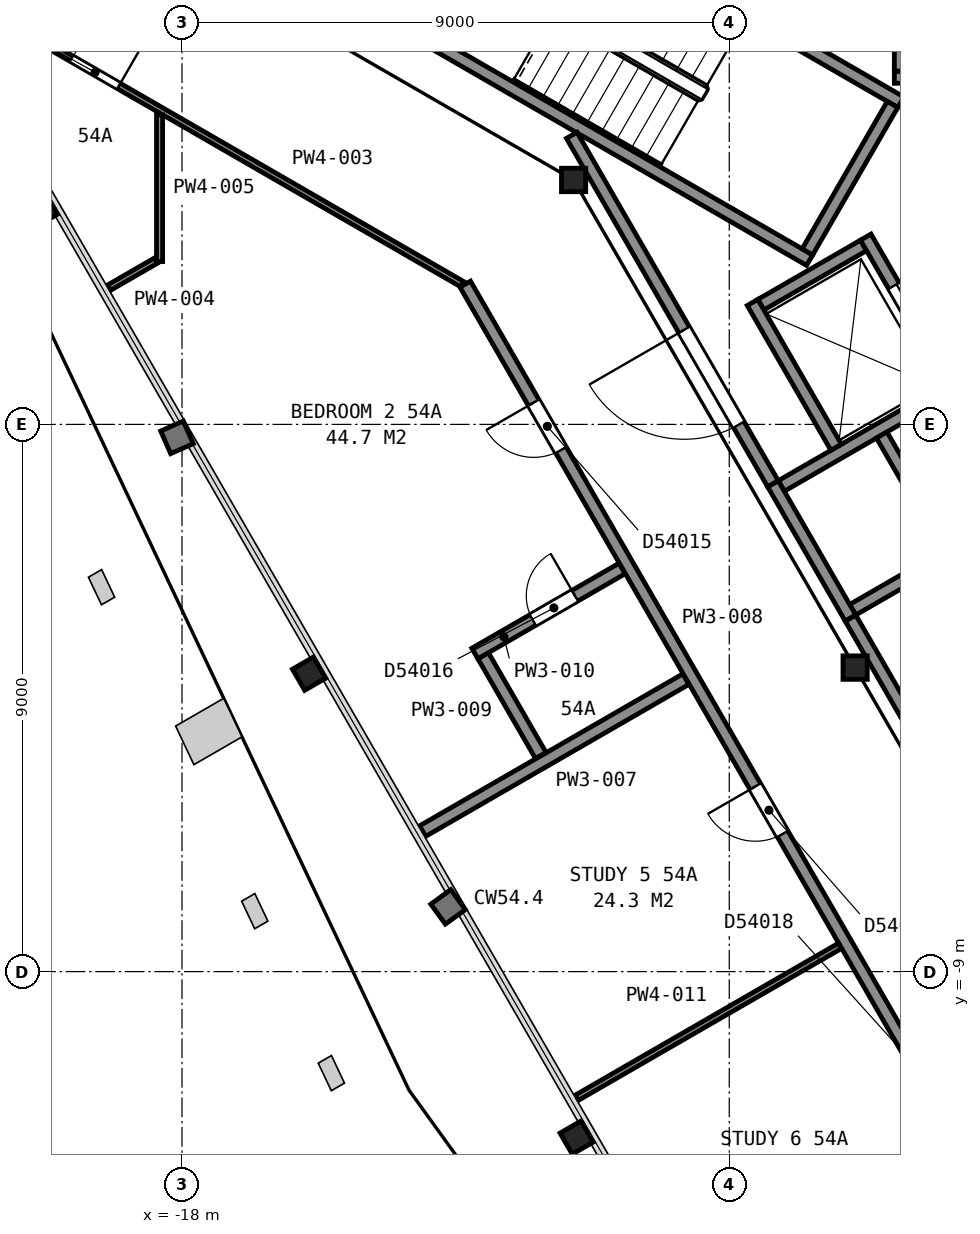
"""IFC4 building model, lengths in metres.
Left out: names, types, materials, properties, quantities, classifications, styles, units other than length and angle.
Written with IfcOpenShell. Run it as: python <this file> out.ifc"""

import sys

from ifc_helpers import new_model, si_unit, direction, frame, frame_2d, origin, origin_2d, place, context, subcontext, project, spatial, rectangle, i_section, extrude, element, fill, save


model = new_model("IFC4")
c1 = context("Model", 3, precision=1e-05, world=origin(), true_north=direction((0.0, 1.0)))
c2 = subcontext(c1, "Body", "Model", "MODEL_VIEW")
j1 = project(units=[si_unit("LENGTHUNIT", "METRE"), si_unit("PLANEANGLEUNIT", "RADIAN")], contexts=[c1])
p1 = place(None, origin())
s1 = spatial("IfcSite", under=j1, at=p1, CompositionType="ELEMENT")
p2 = place(p1, origin())
s2 = spatial("IfcBuilding", under=s1, at=p2, CompositionType="ELEMENT")
p3 = place(p2, frame((0.0, 0.0, 217.5)))
s3 = spatial("IfcBuildingStorey", under=s2, at=p3, CompositionType="ELEMENT", Elevation=217.5)
p4 = place(p3, frame((-20.32, 3.53, 0.04), z_axis=(0.0, 0.0, 1.0), x_axis=(-0.5, 0.866025403784, 0.0)))
e1 = element("IfcColumn", 1, at=p4, inside=s3, PredefinedType="COLUMN", context=c2, shape_type="SweptSolid", body=[
    extrude(i_section(OverallWidth=0.401, OverallDepth=0.399, WebThickness=0.025, FlangeThickness=0.04, FilletRadius=0.015, at=origin_2d()), origin(), (0.0, 0.0, 1.0), 3.66),
])
for number, where, z_axis, x_axis in (
    (2, (-15.91, -4.1, 0.035), (0.0, 0.0, 1.0), (-0.5, 0.866, 0.0)),
    (3, (-11.51, -11.73, 0.035), (0.0, 0.0, 1.0), (-0.5, 0.866, 0.0)),
):
    element("IfcColumn", number, at=place(p3, frame(where, z_axis=z_axis, x_axis=x_axis)), inside=s3, PredefinedType="COLUMN", context=c2, shape_type="SweptSolid", body=[
        extrude(i_section(OverallWidth=0.401, OverallDepth=0.399, WebThickness=0.025, FlangeThickness=0.04, FilletRadius=0.015, at=origin_2d()), origin(), (0.0, 0.0, 1.0), 3.665),
    ])
for number, where, z_axis, x_axis in (
    (4, (-11.56, 4.02, 0.0), (0.0, 0.0, 1.0), (1.0, 0.0, 0.0)),
    (5, (-6.93, -4.0, 0.0), (0.0, 0.0, 1.0), (1.0, 0.0, 0.0)),
):
    element("IfcColumn", number, at=place(p3, frame(where, z_axis=z_axis, x_axis=x_axis)), inside=s3, PredefinedType="COLUMN", context=c2, shape_type="SweptSolid", body=[
        extrude(i_section(OverallWidth=0.399, OverallDepth=0.386, WebThickness=0.021, FlangeThickness=0.033, FilletRadius=0.015, at=origin_2d()), origin(), (0.0, 0.0, 1.0), 3.7),
    ])
for number, where, z_axis, x_axis in (
    (6, (-7.678, 2.701, 0.0), (0.0, 0.0, 1.0), (-0.866, 0.5, 0.0)),
    (7, (-6.178, 5.299, 0.0), (0.0, 0.0, 1.0), (-0.866, 0.5, 0.0)),
):
    element("IfcWall", number, at=place(p3, frame(where, z_axis=z_axis, x_axis=x_axis)), inside=s3, PredefinedType="PARTITIONING", context=c2, shape_type="SweptSolid", body=[
        extrude(rectangle(XDim=9.6, YDim=0.2, at=frame_2d((4.8, 0.0))), origin(), (0.0, 0.0, 1.0), 3.45),
    ])
p5 = place(p3, frame((-6.315, 5.262, 0.0), z_axis=(0.0, 0.0, 1.0), x_axis=(-0.500049511043, -0.865996816683, 0.0)))
e8 = element("IfcWall", 8, at=p5, inside=s3, PredefinedType="PARTITIONING", context=c2, shape_type="SweptSolid", body=[
    extrude(rectangle(XDim=2.8, YDim=0.2, at=frame_2d((1.4, 0.0))), origin(), (0.0, 0.0, 1.0), 3.45),
])
p6 = place(p3, frame((-6.285, 5.71, 0.0), z_axis=(0.0, 0.0, 1.0), x_axis=(1.0, 0.0, 0.0)))
e9 = element("IfcWall", 9, at=p6, inside=s3, PredefinedType="PARTITIONING", context=c2, shape_type="SweptSolid", body=[
    extrude(rectangle(XDim=2.35, YDim=0.2, at=frame_2d((1.175, 0.0))), origin(), (0.0, 0.0, 1.0), 3.7),
])
p7 = place(p3, frame((-6.97, -3.048, 0.0), z_axis=(0.0, 0.0, 1.0), x_axis=(0.866036909293, 0.499980071345, 0.0)))
e10 = element("IfcWall", 10, at=p7, inside=s3, PredefinedType="PARTITIONING", context=c2, shape_type="SweptSolid", body=[
    extrude(rectangle(XDim=1.75, YDim=0.2, at=frame_2d((0.875, 0.0))), origin(), (0.0, 0.0, 1.0), 3.7),
])
p8 = place(p3, frame((-8.145, -1.013, 0.0), z_axis=(0.0, 0.0, 1.0), x_axis=(0.866016494683, 0.500015430699, 0.0)))
e11 = element("IfcWall", 11, at=p8, inside=s3, PredefinedType="PARTITIONING", context=c2, shape_type="SweptSolid", body=[
    extrude(rectangle(XDim=3.15, YDim=0.2, at=frame_2d((1.575, 0.0))), origin(), (0.0, 0.0, 1.0), 3.7),
])
p9 = place(p3, frame((-8.48, 1.969, 0.0), z_axis=(0.0, 0.0, 1.0), x_axis=(0.866000020948, 0.500043961785, 0.0)))
e12 = element("IfcWall", 12, at=p9, inside=s3, PredefinedType="PARTITIONING", context=c2, shape_type="SweptSolid", body=[
    extrude(rectangle(XDim=1.95, YDim=0.2, at=frame_2d((0.975, 0.0))), origin(), (0.0, 0.0, 1.0), 3.7),
])
p10 = place(p3, frame((-6.185, 5.81, 0.0), z_axis=(0.0, 0.0, 1.0), x_axis=(0.0, 1.0, 0.0)))
e13 = element("IfcWall", 13, at=p10, inside=s3, PredefinedType="PARTITIONING", context=c2, shape_type="SweptSolid", body=[
    extrude(rectangle(XDim=1.75, YDim=0.2, at=frame_2d((0.875, 0.0))), origin(), (0.0, 0.0, 1.0), 3.7),
])
p11 = place(p3, frame((-5.28, 0.525, 0.0), z_axis=(0.0, 0.0, 1.0), x_axis=(-0.500037662692, 0.866003658127, 0.0)))
e14 = element("IfcWall", 14, at=p11, inside=s3, PredefinedType="PARTITIONING", context=c2, shape_type="SweptSolid", body=[
    extrude(rectangle(XDim=2.95, YDim=0.2, at=frame_2d((1.475, 0.0))), origin(), (0.0, 0.0, 1.0), 3.7),
])
p12 = place(p11, frame((0.925, 0.0, 0.0)))
e15 = element("IfcOpeningElement", 15, at=p12, cuts=e14, PredefinedType="OPENING", context=c2, shape_type="SweptSolid", body=[
    extrude(rectangle(XDim=1.1, YDim=2.1, at=frame_2d((0.55, 1.05))), frame((0.0, 0.11, 0.0), z_axis=(0.0, -1.0, 0.0), x_axis=(1.0, 0.0, 0.0)), (0.0, 0.0, 1.0), 0.22),
])
p13 = place(p3, frame((-5.318, -2.21, 0.0), z_axis=(0.0, 0.0, 1.0), x_axis=(-0.499938297808, 0.866061024631, 0.0)))
e16 = element("IfcWall", 16, at=p13, inside=s3, PredefinedType="PARTITIONING", context=c2, shape_type="SweptSolid", body=[
    extrude(rectangle(XDim=2.35, YDim=0.2, at=frame_2d((1.175, 0.0))), origin(), (0.0, 0.0, 1.0), 3.7),
])
p14 = place(p3, frame((-7.242, -0.376, 0.0), z_axis=(0.0, 0.0, 1.0), x_axis=(-0.499996545922, 0.866027397988, 0.0)))
e17 = element("IfcWall", 17, at=p14, inside=s3, PredefinedType="PARTITIONING", context=c2, shape_type="SweptSolid", body=[
    extrude(rectangle(XDim=2.75, YDim=0.2, at=frame_2d((1.375, 0.0))), origin(), (0.0, 0.0, 1.0), 3.7),
])
p15 = place(p3, frame((-7.006, -3.185, 0.0), z_axis=(0.0, 0.0, 1.0), x_axis=(-0.499990435942, 0.866030925526, 0.0)))
e18 = element("IfcWall", 18, at=p15, inside=s3, PredefinedType="PARTITIONING", context=c2, shape_type="SweptSolid", body=[
    extrude(rectangle(XDim=2.55, YDim=0.2, at=frame_2d((1.275, 0.0))), origin(), (0.0, 0.0, 1.0), 3.7),
])
p16 = place(p3, frame((-11.591, 4.755, 0.0), z_axis=(0.0, 0.0, 1.0), x_axis=(0.500043977787, -0.866000011708, 0.0)))
e19 = element("IfcWall", 19, at=p16, inside=s3, PredefinedType="PARTITIONING", context=c2, shape_type="SweptSolid", body=[
    extrude(rectangle(XDim=6.617, YDim=0.2, at=frame_2d((3.308, 0.0))), origin(), (0.0, 0.0, 1.0), 3.45),
])
p17 = place(p16, frame((3.695, 0.0, 0.0)))
e20 = element("IfcOpeningElement", 20, at=p17, cuts=e19, PredefinedType="OPENING", context=c2, shape_type="SweptSolid", body=[
    extrude(rectangle(XDim=1.8, YDim=2.1, at=frame_2d((0.9, 1.05))), frame((0.0, 0.11, 0.0), z_axis=(0.0, -1.0, 0.0), x_axis=(1.0, 0.0, 0.0)), (0.0, 0.0, 1.0), 0.22),
])
p18 = place(p3, frame((-7.005, -3.187, 0.0), z_axis=(0.0, 0.0, 1.0), x_axis=(0.499689606989, -0.866204535123, 0.0)))
e21 = element("IfcWall", 21, at=p18, inside=s3, PredefinedType="PARTITIONING", context=c2, shape_type="SweptSolid", body=[
    extrude(rectangle(XDim=2.145, YDim=0.2, at=frame_2d((1.072, 0.0))), origin(), (0.0, 0.0, 1.0), 3.45),
])
p19 = place(p3, frame((-13.391, 2.305, 0.0), z_axis=(0.0, 0.0, 1.0), x_axis=(-0.86606177021, 0.499937006213, 0.0)))
e22 = element("IfcWall", 22, at=p19, inside=s3, PredefinedType="PARTITIONING", context=c2, shape_type="SweptSolid", body=[
    extrude(rectangle(XDim=8.504, YDim=0.1, at=frame_2d((4.252, 0.0))), origin(), (0.0, 0.0, 1.0), 2.713),
])
p20 = place(p19, frame((6.522, 0.0, 0.0)))
e23 = element("IfcOpeningElement", 23, at=p20, cuts=e22, PredefinedType="OPENING", context=c2, shape_type="SweptSolid", body=[
    extrude(rectangle(XDim=0.9, YDim=2.1, at=frame_2d((0.45, 1.05))), frame((0.0, 0.06, 0.0), z_axis=(0.0, -1.0, 0.0), x_axis=(1.0, 0.0, 0.0)), (0.0, 0.0, 1.0), 0.12),
])
p21 = place(p3, frame((-19.202, 2.247, 0.0), z_axis=(0.0, 0.0, 1.0), x_axis=(0.86604424267, 0.499967368674, 0.0)))
e24 = element("IfcWall", 24, at=p21, inside=s3, PredefinedType="PARTITIONING", context=c2, shape_type="SweptSolid", body=[
    extrude(rectangle(XDim=0.892, YDim=0.1, at=frame_2d((0.446, 0.0))), origin(), (0.0, 0.0, 1.0), 2.713),
])
p22 = place(p3, frame((-18.369, 2.678, 0.0), z_axis=(0.0, 0.0, 1.0), x_axis=(0.0, 1.0, 0.0)))
e25 = element("IfcWall", 25, at=p22, inside=s3, PredefinedType="PARTITIONING", context=c2, shape_type="SweptSolid", body=[
    extrude(rectangle(XDim=2.414, YDim=0.1, at=frame_2d((1.207, 0.0))), origin(), (0.0, 0.0, 1.0), 2.713),
])
p23 = place(p3, frame((-14.043, -6.689, 0.0), z_axis=(0.0, 0.0, 1.0), x_axis=(0.866053039883, 0.499952129818, 0.0)))
e26 = element("IfcWall", 26, at=p23, inside=s3, PredefinedType="PARTITIONING", context=c2, shape_type="SweptSolid", body=[
    extrude(rectangle(XDim=5.0, YDim=0.2, at=frame_2d((2.5, 0.0))), origin(), (0.0, 0.0, 1.0), 2.713),
])
p24 = place(p3, frame((-4.675, -12.706, 0.0), z_axis=(0.0, 0.0, 1.0), x_axis=(-0.49997440863, 0.866040178465, 0.0)))
e27 = element("IfcWall", 27, at=p24, inside=s3, PredefinedType="PARTITIONING", context=c2, shape_type="SweptSolid", body=[
    extrude(rectangle(XDim=17.335, YDim=0.2, at=frame_2d((8.667, 0.0))), origin(), (0.0, 0.0, 1.0), 2.713),
])
p25 = place(p24, frame((14.185, 0.0, 0.0)))
e28 = element("IfcOpeningElement", 28, at=p25, cuts=e27, PredefinedType="OPENING", context=c2, shape_type="SweptSolid", body=[
    extrude(rectangle(XDim=0.9, YDim=2.1, at=frame_2d((0.45, 1.05))), frame((0.0, 0.11, 0.0), z_axis=(0.0, -1.0, 0.0), x_axis=(1.0, 0.0, 0.0)), (0.0, 0.0, 1.0), 0.22),
])
p26 = place(p24, frame((6.895, 0.0, 0.0)))
e29 = element("IfcOpeningElement", 29, at=p26, cuts=e27, PredefinedType="OPENING", context=c2, shape_type="SweptSolid", body=[
    extrude(rectangle(XDim=0.9, YDim=2.1, at=frame_2d((0.45, 1.05))), frame((0.0, 0.11, 0.0), z_axis=(0.0, -1.0, 0.0), x_axis=(1.0, 0.0, 0.0)), (0.0, 0.0, 1.0), 0.22),
])
p27 = place(p24, frame((1.979, 0.0, 0.0)))
e30 = element("IfcOpeningElement", 30, at=p27, cuts=e27, PredefinedType="OPENING", context=c2, shape_type="SweptSolid", body=[
    extrude(rectangle(XDim=0.9, YDim=2.1, at=frame_2d((0.45, 1.05))), frame((0.0, 0.11, 0.0), z_axis=(0.0, -1.0, 0.0), x_axis=(1.0, 0.0, 0.0)), (0.0, 0.0, 1.0), 0.22),
])
p28 = place(p3, frame((-13.047, -3.805, 0.0), z_axis=(0.0, 0.0, 1.0), x_axis=(0.499949193323, -0.866054735046, 0.0)))
e31 = element("IfcWall", 31, at=p28, inside=s3, PredefinedType="PARTITIONING", context=c2, shape_type="SweptSolid", body=[
    extrude(rectangle(XDim=1.895, YDim=0.2, at=frame_2d((0.948, 0.0))), origin(), (0.0, 0.0, 1.0), 2.713),
])
p29 = place(p3, frame((-10.763, -2.371, 0.0), z_axis=(0.0, 0.0, 1.0), x_axis=(-0.866041588165, -0.499971966783, 0.0)))
e32 = element("IfcWall", 32, at=p29, inside=s3, PredefinedType="PARTITIONING", context=c2, shape_type="SweptSolid", body=[
    extrude(rectangle(XDim=2.795, YDim=0.2, at=frame_2d((1.397, 0.0))), origin(), (0.0, 0.0, 1.0), 2.713),
])
p30 = place(p29, frame((0.895, 0.0, 0.0)))
e33 = element("IfcOpeningElement", 33, at=p30, cuts=e32, PredefinedType="OPENING", context=c2, shape_type="SweptSolid", body=[
    extrude(rectangle(XDim=0.8, YDim=2.1, at=frame_2d((0.4, 1.05))), frame((0.0, 0.11, 0.0), z_axis=(0.0, -1.0, 0.0), x_axis=(1.0, 0.0, 0.0)), (0.0, 0.0, 1.0), 0.22),
])
p31 = place(p3, frame((-11.51, -11.076, 0.0), z_axis=(0.0, 0.0, 1.0), x_axis=(0.866053039883, 0.499952129818, 0.0)))
e34 = element("IfcWall", 34, at=p31, inside=s3, PredefinedType="PARTITIONING", context=c2, shape_type="SweptSolid", body=[
    extrude(rectangle(XDim=5.0, YDim=0.1, at=frame_2d((2.5, 0.0))), origin(), (0.0, 0.0, 1.0), 2.713),
])
p32 = place(p12, origin())
e35 = element("IfcDoor", 35, at=p32, inside=s3, OperationType="SLIDING_TO_LEFT", PredefinedType="DOOR", context=c2, shape_type="SweptSolid", body=[
    extrude(rectangle(XDim=1.1, YDim=2.1, at=frame_2d((0.55, 1.05))), frame((0.0, 0.025, 0.0), z_axis=(0.0, -1.0, 0.0), x_axis=(1.0, 0.0, 0.0)), (0.0, 0.0, 1.0), 0.05),
])
fill(e15, e35)
p33 = place(p17, origin())
e36 = element("IfcDoor", 36, at=p33, inside=s3, OperationType="DOUBLE_DOOR_SINGLE_SWING", PredefinedType="DOOR", context=c2, shape_type="SweptSolid", body=[
    extrude(rectangle(XDim=1.8, YDim=2.1, at=frame_2d((0.9, 1.05))), frame((0.0, 0.025, 0.0), z_axis=(0.0, -1.0, 0.0), x_axis=(1.0, 0.0, 0.0)), (0.0, 0.0, 1.0), 0.05),
])
fill(e20, e36)
p34 = place(p20, origin())
e37 = element("IfcDoor", 37, at=p34, inside=s3, OperationType="SINGLE_SWING_LEFT", PredefinedType="DOOR", context=c2, shape_type="SweptSolid", body=[
    extrude(rectangle(XDim=0.9, YDim=2.1, at=frame_2d((0.45, 1.05))), frame((0.0, 0.025, 0.0), z_axis=(0.0, -1.0, 0.0), x_axis=(1.0, 0.0, 0.0)), (0.0, 0.0, 1.0), 0.05),
])
fill(e23, e37)
p35 = place(p25, origin())
e38 = element("IfcDoor", 38, at=p35, inside=s3, OperationType="SINGLE_SWING_RIGHT", PredefinedType="DOOR", context=c2, shape_type="SweptSolid", body=[
    extrude(rectangle(XDim=0.9, YDim=2.1, at=frame_2d((0.45, 1.05))), frame((0.0, 0.025, 0.0), z_axis=(0.0, -1.0, 0.0), x_axis=(1.0, 0.0, 0.0)), (0.0, 0.0, 1.0), 0.05),
])
fill(e28, e38)
p36 = place(p26, origin())
e39 = element("IfcDoor", 39, at=p36, inside=s3, OperationType="SINGLE_SWING_RIGHT", PredefinedType="DOOR", context=c2, shape_type="SweptSolid", body=[
    extrude(rectangle(XDim=0.9, YDim=2.1, at=frame_2d((0.45, 1.05))), frame((0.0, 0.025, 0.0), z_axis=(0.0, -1.0, 0.0), x_axis=(1.0, 0.0, 0.0)), (0.0, 0.0, 1.0), 0.05),
])
fill(e29, e39)
p37 = place(p30, origin())
e40 = element("IfcDoor", 40, at=p37, inside=s3, OperationType="SINGLE_SWING_LEFT", PredefinedType="DOOR", context=c2, shape_type="SweptSolid", body=[
    extrude(rectangle(XDim=0.8, YDim=2.1, at=frame_2d((0.4, 1.05))), frame((0.0, 0.025, 0.0), z_axis=(0.0, -1.0, 0.0), x_axis=(1.0, 0.0, 0.0)), (0.0, 0.0, 1.0), 0.05),
])
fill(e33, e40)
save(model, sys.argv[1])
